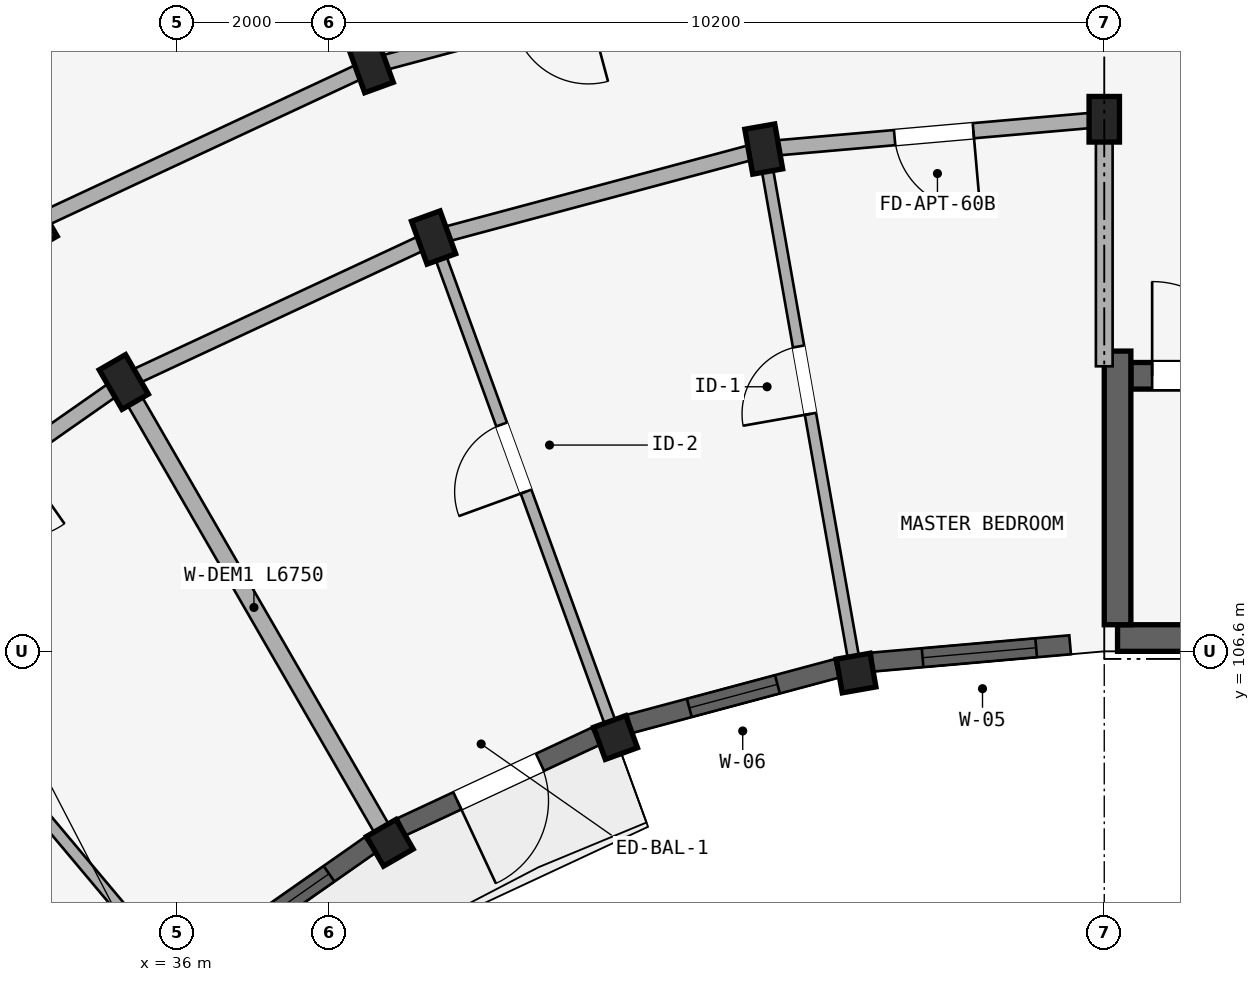
"""IFC4 building model, lengths in metres.
Left out: names, types, materials, properties, quantities, classifications, styles, units other than length and angle.
Written with IfcOpenShell. Run it as: python <this file> out.ifc"""

import sys

from ifc_helpers import new_model, si_unit, direction, frame, frame_2d, origin, origin_2d, place, context, subcontext, project, spatial, rectangle, extrude, element, fill, save


model = new_model("IFC4")
c1 = context("Model", 3, precision=1e-05, world=origin(), true_north=direction((0.0, 1.0)))
c2 = subcontext(c1, "Body", "Model", "MODEL_VIEW")
j1 = project(units=[si_unit("LENGTHUNIT", "METRE"), si_unit("PLANEANGLEUNIT", "RADIAN")], contexts=[c1])
p1 = place(None, origin())
s1 = spatial("IfcSite", under=j1, at=p1, CompositionType="ELEMENT")
p2 = place(p1, origin())
s2 = spatial("IfcBuilding", under=s1, at=p2, CompositionType="ELEMENT")
p3 = place(p2, frame((0.0, 0.0, 43.35)))
s3 = spatial("IfcBuildingStorey", under=s2, at=p3, CompositionType="ELEMENT", Elevation=43.35)
p4 = place(p3, frame((48.375, 106.775, 0.0), z_axis=(0.0, 0.0, 1.0), x_axis=(1.0, 0.0, 0.0)))
e1 = element("IfcWall", 1, at=p4, inside=s3, PredefinedType="SHEAR", context=c2, shape_type="SweptSolid", body=[
    extrude(rectangle(XDim=8.25, YDim=0.35, at=frame_2d((4.125, 0.0))), origin(), (0.0, 0.0, 1.0), 2.93),
])
p5 = place(p3, frame((48.55, 110.225, 0.0), z_axis=(0.0, 0.0, 1.0), x_axis=(1.0, 0.0, 0.0)))
e2 = element("IfcWall", 2, at=p5, inside=s3, PredefinedType="SHEAR", context=c2, shape_type="SweptSolid", body=[
    extrude(rectangle(XDim=7.9, YDim=0.35, at=frame_2d((3.95, 0.0))), origin(), (0.0, 0.0, 1.0), 2.93),
])
p6 = place(p5, frame((0.28, 0.0, 0.0)))
e3 = element("IfcOpeningElement", 3, at=p6, cuts=e2, PredefinedType="OPENING", context=c2, shape_type="SweptSolid", body=[
    extrude(rectangle(XDim=1.24, YDim=2.15, at=frame_2d((0.62, 1.075))), frame((0.0, 0.185, 0.0), z_axis=(0.0, -1.0, 0.0), x_axis=(1.0, 0.0, 0.0)), (0.0, 0.0, 1.0), 0.37),
])
p7 = place(p3, frame((48.375, 106.95, 0.0), z_axis=(0.0, 0.0, 1.0), x_axis=(0.0, 1.0, 0.0)))
e4 = element("IfcWall", 4, at=p7, inside=s3, PredefinedType="SHEAR", context=c2, shape_type="SweptSolid", body=[
    extrude(rectangle(XDim=3.6, YDim=0.35, at=frame_2d((1.8, 0.0))), origin(), (0.0, 0.0, 1.0), 2.93),
])
p8 = place(p3, frame((48.2, 113.6, 0.0), z_axis=(0.0, 0.0, 1.0), x_axis=(1.0, 0.0, 0.0)))
e5 = element("IfcColumn", 5, at=p8, inside=s3, PredefinedType="COLUMN", context=c2, shape_type="SweptSolid", body=[
    extrude(rectangle(XDim=0.4, YDim=0.6, at=origin_2d()), origin(), (0.0, 0.0, 1.0), 2.93),
])
p9 = place(p3, frame((44.935, 106.314, 0.0), z_axis=(0.0, 0.0, 1.0), x_axis=(0.984807753012, 0.173648177667, 0.0)))
e6 = element("IfcColumn", 6, at=p9, inside=s3, PredefinedType="COLUMN", context=c2, shape_type="SweptSolid", body=[
    extrude(rectangle(XDim=0.45, YDim=0.45, at=origin_2d()), origin(), (0.0, 0.0, 1.0), 2.93),
])
p10 = place(p3, frame((43.72, 113.208, 0.0), z_axis=(0.0, 0.0, 1.0), x_axis=(0.984807753012, 0.173648177667, 0.0)))
e7 = element("IfcColumn", 7, at=p10, inside=s3, PredefinedType="COLUMN", context=c2, shape_type="SweptSolid", body=[
    extrude(rectangle(XDim=0.4, YDim=0.6, at=origin_2d()), origin(), (0.0, 0.0, 1.0), 2.93),
])
p11 = place(p3, frame((41.77, 105.466, 0.0), z_axis=(0.0, 0.0, 1.0), x_axis=(0.939692620786, 0.342020143326, 0.0)))
e8 = element("IfcColumn", 8, at=p11, inside=s3, PredefinedType="COLUMN", context=c2, shape_type="SweptSolid", body=[
    extrude(rectangle(XDim=0.45, YDim=0.45, at=origin_2d()), origin(), (0.0, 0.0, 1.0), 2.93),
])
for number, where, z_axis, x_axis in (
    (9, (39.376, 112.044, 0.0), (0.0, 0.0, 1.0), (0.94, 0.342, 0.0)),
    (10, (38.555, 114.299, 0.0), (0.0, 0.0, 1.0), (0.94, 0.342, 0.0)),
):
    element("IfcColumn", number, at=place(p3, frame(where, z_axis=z_axis, x_axis=x_axis)), inside=s3, PredefinedType="COLUMN", context=c2, shape_type="SweptSolid", body=[
        extrude(rectangle(XDim=0.4, YDim=0.6, at=origin_2d()), origin(), (0.0, 0.0, 1.0), 2.93),
    ])
p12 = place(p3, frame((38.8, 104.081, 0.0), z_axis=(0.0, 0.0, 1.0), x_axis=(0.866025403784, 0.5, 0.0)))
e11 = element("IfcColumn", 11, at=p12, inside=s3, PredefinedType="COLUMN", context=c2, shape_type="SweptSolid", body=[
    extrude(rectangle(XDim=0.45, YDim=0.45, at=origin_2d()), origin(), (0.0, 0.0, 1.0), 2.93),
])
for number, where, z_axis, x_axis in (
    (12, (35.3, 110.144, 0.0), (0.0, 0.0, 1.0), (0.866, 0.5, 0.0)),
    (13, (34.1, 112.222, 0.0), (0.0, 0.0, 1.0), (0.866, 0.5, 0.0)),
):
    element("IfcColumn", number, at=place(p3, frame(where, z_axis=z_axis, x_axis=x_axis)), inside=s3, PredefinedType="COLUMN", context=c2, shape_type="SweptSolid", body=[
        extrude(rectangle(XDim=0.4, YDim=0.6, at=origin_2d()), origin(), (0.0, 0.0, 1.0), 2.93),
    ])
p13 = place(p3, frame((48.2, 113.6, 0.0), z_axis=(0.0, 0.0, 1.0), x_axis=(-0.996191949488, -0.087187153726, 0.0)))
e14 = element("IfcWall", 14, at=p13, inside=s3, PredefinedType="STANDARD", context=c2, shape_type="SweptSolid", body=[
    extrude(rectangle(XDim=4.497, YDim=0.2, at=frame_2d((2.249, 0.0))), origin(), (0.0, 0.0, 1.0), 2.372),
])
p14 = place(p13, frame((1.729, 0.0, 0.0)))
e15 = element("IfcOpeningElement", 15, at=p14, cuts=e14, PredefinedType="OPENING", context=c2, shape_type="SweptSolid", body=[
    extrude(rectangle(XDim=1.04, YDim=2.15, at=frame_2d((0.52, 1.075))), frame((0.0, 0.11, 0.0), z_axis=(0.0, -1.0, 0.0), x_axis=(1.0, 0.0, 0.0)), (0.0, 0.0, 1.0), 0.22),
])
p15 = place(p3, frame((43.72, 113.208, 0.0), z_axis=(0.0, 0.0, 1.0), x_axis=(-0.965934240054, -0.258787642463, 0.0)))
e16 = element("IfcWall", 16, at=p15, inside=s3, PredefinedType="STANDARD", context=c2, shape_type="SweptSolid", body=[
    extrude(rectangle(XDim=4.497, YDim=0.2, at=frame_2d((2.249, 0.0))), origin(), (0.0, 0.0, 1.0), 2.372),
])
p16 = place(p3, frame((43.303, 115.572, 0.0), z_axis=(0.0, 0.0, 1.0), x_axis=(-0.965930095386, -0.258803112091, 0.0)))
e17 = element("IfcWall", 17, at=p16, inside=s3, PredefinedType="STANDARD", context=c2, shape_type="SweptSolid", body=[
    extrude(rectangle(XDim=4.916, YDim=0.2, at=frame_2d((2.458, 0.0))), origin(), (0.0, 0.0, 1.0), 2.372),
])
p17 = place(p16, frame((1.958, 0.0, 0.0)))
e18 = element("IfcOpeningElement", 18, at=p17, cuts=e17, PredefinedType="OPENING", context=c2, shape_type="SweptSolid", body=[
    extrude(rectangle(XDim=1.0, YDim=2.15, at=frame_2d((0.5, 1.075))), frame((0.0, 0.11, 0.0), z_axis=(0.0, -1.0, 0.0), x_axis=(1.0, 0.0, 0.0)), (0.0, 0.0, 1.0), 0.22),
])
p18 = place(p3, frame((39.376, 112.044, 0.0), z_axis=(0.0, 0.0, 1.0), x_axis=(-0.906307919131, -0.422617978463, 0.0)))
e19 = element("IfcWall", 19, at=p18, inside=s3, PredefinedType="STANDARD", context=c2, shape_type="SweptSolid", body=[
    extrude(rectangle(XDim=4.497, YDim=0.2, at=frame_2d((2.249, 0.0))), origin(), (0.0, 0.0, 1.0), 2.372),
])
p19 = place(p3, frame((38.555, 114.299, 0.0), z_axis=(0.0, 0.0, 1.0), x_axis=(-0.906302381024, -0.422629854778, 0.0)))
e20 = element("IfcWall", 20, at=p19, inside=s3, PredefinedType="STANDARD", context=c2, shape_type="SweptSolid", body=[
    extrude(rectangle(XDim=4.915, YDim=0.2, at=frame_2d((2.458, 0.0))), origin(), (0.0, 0.0, 1.0), 2.372),
])
p20 = place(p3, frame((35.3, 110.144, 0.0), z_axis=(0.0, 0.0, 1.0), x_axis=(-0.819155404658, -0.573571637217, 0.0)))
e21 = element("IfcWall", 21, at=p20, inside=s3, PredefinedType="STANDARD", context=c2, shape_type="SweptSolid", body=[
    extrude(rectangle(XDim=4.497, YDim=0.2, at=frame_2d((2.249, 0.0))), origin(), (0.0, 0.0, 1.0), 2.372),
])
p21 = place(p20, frame((1.709, 0.0, 0.0)))
e22 = element("IfcOpeningElement", 22, at=p21, cuts=e21, PredefinedType="OPENING", context=c2, shape_type="SweptSolid", body=[
    extrude(rectangle(XDim=1.08, YDim=2.15, at=frame_2d((0.54, 1.075))), frame((0.0, 0.11, 0.0), z_axis=(0.0, -1.0, 0.0), x_axis=(1.0, 0.0, 0.0)), (0.0, 0.0, 1.0), 0.22),
])
p22 = place(p3, frame((48.2, 110.35, 0.0), z_axis=(0.0, 0.0, 1.0), x_axis=(0.0, 1.0, 0.0)))
e23 = element("IfcWall", 23, at=p22, inside=s3, PredefinedType="STANDARD", context=c2, shape_type="SweptSolid", body=[
    extrude(rectangle(XDim=3.2, YDim=0.22, at=frame_2d((1.6, 0.0))), origin(), (0.0, 0.0, 1.0), 2.372),
])
p23 = place(p3, frame((44.901, 106.511, 0.0), z_axis=(0.0, 0.0, 1.0), x_axis=(-0.173647089161, 0.984807944945, 0.0)))
e24 = element("IfcWall", 24, at=p23, inside=s3, PredefinedType="PARTITIONING", context=c2, shape_type="SweptSolid", body=[
    extrude(rectangle(XDim=6.75, YDim=0.15, at=frame_2d((3.375, 0.0))), origin(), (0.0, 0.0, 1.0), 2.372),
])
p24 = place(p23, frame((3.262, 0.0, 0.0)))
e25 = element("IfcOpeningElement", 25, at=p24, cuts=e24, PredefinedType="OPENING", context=c2, shape_type="SweptSolid", body=[
    extrude(rectangle(XDim=0.9, YDim=2.1, at=frame_2d((0.45, 1.05))), frame((0.0, 0.085, 0.0), z_axis=(0.0, -1.0, 0.0), x_axis=(1.0, 0.0, 0.0)), (0.0, 0.0, 1.0), 0.17),
])
p25 = place(p3, frame((41.702, 105.654, 0.0), z_axis=(0.0, 0.0, 1.0), x_axis=(-0.342010221662, 0.939696231917, 0.0)))
e26 = element("IfcWall", 26, at=p25, inside=s3, PredefinedType="PARTITIONING", context=c2, shape_type="SweptSolid", body=[
    extrude(rectangle(XDim=6.75, YDim=0.15, at=frame_2d((3.375, 0.0))), origin(), (0.0, 0.0, 1.0), 2.372),
])
p26 = place(p25, frame((3.242, 0.0, 0.0)))
e27 = element("IfcOpeningElement", 27, at=p26, cuts=e26, PredefinedType="OPENING", context=c2, shape_type="SweptSolid", body=[
    extrude(rectangle(XDim=0.94, YDim=2.1, at=frame_2d((0.47, 1.05))), frame((0.0, 0.085, 0.0), z_axis=(0.0, -1.0, 0.0), x_axis=(1.0, 0.0, 0.0)), (0.0, 0.0, 1.0), 0.17),
])
p27 = place(p3, frame((38.521, 114.393, 0.0), z_axis=(0.0, 0.0, 1.0), x_axis=(-0.342005081534, 0.939698102693, 0.0)))
e28 = element("IfcWall", 28, at=p27, inside=s3, PredefinedType="PARTITIONING", context=c2, shape_type="SweptSolid", body=[
    extrude(rectangle(XDim=11.82, YDim=0.125, at=frame_2d((5.91, 0.0))), origin(), (0.0, 0.0, 1.0), 2.372),
])
p28 = place(p27, frame((7.5, 0.0, 0.0)))
e29 = element("IfcOpeningElement", 29, at=p28, cuts=e28, PredefinedType="OPENING", context=c2, shape_type="SweptSolid", body=[
    extrude(rectangle(XDim=0.8, YDim=2.1, at=frame_2d((0.4, 1.05))), frame((0.0, 0.073, 0.0), z_axis=(0.0, -1.0, 0.0), x_axis=(1.0, 0.0, 0.0)), (0.0, 0.0, 1.0), 0.145),
])
p29 = place(p3, frame((38.7, 104.254, 0.0), z_axis=(0.0, 0.0, 1.0), x_axis=(-0.499997969693, 0.866026575979, 0.0)))
e30 = element("IfcWall", 30, at=p29, inside=s3, PredefinedType="STANDARD", context=c2, shape_type="SweptSolid", body=[
    extrude(rectangle(XDim=6.75, YDim=0.22, at=frame_2d((3.375, 0.0))), origin(), (0.0, 0.0, 1.0), 2.372),
])
p30 = place(p3, frame((35.987, 102.355, 0.0), z_axis=(0.0, 0.0, 1.0), x_axis=(-0.642784846501, 0.766046761698, 0.0)))
e31 = element("IfcWall", 31, at=p30, inside=s3, PredefinedType="PARTITIONING", context=c2, shape_type="SweptSolid", body=[
    extrude(rectangle(XDim=6.75, YDim=0.15, at=frame_2d((3.375, 0.0))), origin(), (0.0, 0.0, 1.0), 2.372),
])
p31 = place(p30, frame((3.262, 0.0, 0.0)))
e32 = element("IfcOpeningElement", 32, at=p31, cuts=e31, PredefinedType="OPENING", context=c2, shape_type="SweptSolid", body=[
    extrude(rectangle(XDim=0.9, YDim=2.1, at=frame_2d((0.45, 1.05))), frame((0.0, 0.085, 0.0), z_axis=(0.0, -1.0, 0.0), x_axis=(1.0, 0.0, 0.0)), (0.0, 0.0, 1.0), 0.17),
])
p32 = place(p3, frame((47.751, 106.686, 0.0), z_axis=(0.0, 0.0, 1.0), x_axis=(-0.996188433092, -0.087227322402, 0.0)))
e33 = element("IfcWall", 33, at=p32, inside=s3, PredefinedType="STANDARD", context=c2, shape_type="SweptSolid", body=[
    extrude(rectangle(XDim=2.609, YDim=0.25, at=frame_2d((1.304, 0.0))), origin(), (0.0, 0.0, 1.0), 2.422),
])
p33 = place(p32, frame((0.448, 0.0, 0.572)))
e34 = element("IfcOpeningElement", 34, at=p33, cuts=e33, PredefinedType="OPENING", context=c2, shape_type="SweptSolid", body=[
    extrude(rectangle(XDim=1.5, YDim=1.65, at=frame_2d((0.75, 0.825))), frame((0.0, 0.135, 0.0), z_axis=(0.0, -1.0, 0.0), x_axis=(1.0, 0.0, 0.0)), (0.0, 0.0, 1.0), 0.27),
])
p34 = place(p3, frame((44.682, 106.376, 0.0), z_axis=(0.0, 0.0, 1.0), x_axis=(-0.965921001908, -0.258837049266, 0.0)))
e35 = element("IfcWall", 35, at=p34, inside=s3, PredefinedType="STANDARD", context=c2, shape_type="SweptSolid", body=[
    extrude(rectangle(XDim=2.82, YDim=0.25, at=frame_2d((1.41, 0.0))), origin(), (0.0, 0.0, 1.0), 2.422),
])
p35 = place(p34, frame((0.81, 0.0, 0.722)))
e36 = element("IfcOpeningElement", 36, at=p35, cuts=e35, PredefinedType="OPENING", context=c2, shape_type="SweptSolid", body=[
    extrude(rectangle(XDim=1.2, YDim=1.5, at=frame_2d((0.6, 0.75))), frame((0.0, 0.135, 0.0), z_axis=(0.0, -1.0, 0.0), x_axis=(1.0, 0.0, 0.0)), (0.0, 0.0, 1.0), 0.27),
])
p36 = place(p3, frame((41.51, 105.483, 0.0), z_axis=(0.0, 0.0, 1.0), x_axis=(-0.906284857185, -0.422667431484, 0.0)))
e37 = element("IfcWall", 37, at=p36, inside=s3, PredefinedType="STANDARD", context=c2, shape_type="SweptSolid", body=[
    extrude(rectangle(XDim=2.82, YDim=0.25, at=frame_2d((1.41, 0.0))), origin(), (0.0, 0.0, 1.0), 2.422),
])
p37 = place(p36, frame((0.81, 0.0, 0.0)))
e38 = element("IfcOpeningElement", 38, at=p37, cuts=e37, PredefinedType="OPENING", context=c2, shape_type="SweptSolid", body=[
    extrude(rectangle(XDim=1.2, YDim=2.15, at=frame_2d((0.6, 1.075))), frame((0.0, 0.135, 0.0), z_axis=(0.0, -1.0, 0.0), x_axis=(1.0, 0.0, 0.0)), (0.0, 0.0, 1.0), 0.27),
])
p38 = place(p3, frame((38.541, 104.053, 0.0), z_axis=(0.0, 0.0, 1.0), x_axis=(-0.819154644592, -0.573572722716, 0.0)))
e39 = element("IfcWall", 39, at=p38, inside=s3, PredefinedType="STANDARD", context=c2, shape_type="SweptSolid", body=[
    extrude(rectangle(XDim=2.82, YDim=0.25, at=frame_2d((1.41, 0.0))), origin(), (0.0, 0.0, 1.0), 2.422),
])
p39 = place(p38, frame((0.66, 0.0, 0.572)))
e40 = element("IfcOpeningElement", 40, at=p39, cuts=e39, PredefinedType="OPENING", context=c2, shape_type="SweptSolid", body=[
    extrude(rectangle(XDim=1.5, YDim=1.65, at=frame_2d((0.75, 0.825))), frame((0.0, 0.135, 0.0), z_axis=(0.0, -1.0, 0.0), x_axis=(1.0, 0.0, 0.0)), (0.0, 0.0, 1.0), 0.27),
])
p40 = place(p33, origin())
e41 = element("IfcWindow", 41, at=p40, inside=s3, PartitioningType="DOUBLE_PANEL_VERTICAL", PredefinedType="WINDOW", context=c2, shape_type="SweptSolid", body=[
    extrude(rectangle(XDim=1.5, YDim=1.65, at=frame_2d((0.75, 0.825))), frame((0.0, 0.03, 0.0), z_axis=(0.0, -1.0, 0.0), x_axis=(1.0, 0.0, 0.0)), (0.0, 0.0, 1.0), 0.06),
])
fill(e34, e41)
p41 = place(p35, origin())
e42 = element("IfcWindow", 42, at=p41, inside=s3, PartitioningType="SINGLE_PANEL", PredefinedType="WINDOW", context=c2, shape_type="SweptSolid", body=[
    extrude(rectangle(XDim=1.2, YDim=1.5, at=frame_2d((0.6, 0.75))), frame((0.0, 0.03, 0.0), z_axis=(0.0, -1.0, 0.0), x_axis=(1.0, 0.0, 0.0)), (0.0, 0.0, 1.0), 0.06),
])
fill(e36, e42)
p42 = place(p39, origin())
e43 = element("IfcWindow", 43, at=p42, inside=s3, PartitioningType="DOUBLE_PANEL_VERTICAL", PredefinedType="WINDOW", context=c2, shape_type="SweptSolid", body=[
    extrude(rectangle(XDim=1.5, YDim=1.65, at=frame_2d((0.75, 0.825))), frame((0.0, 0.03, 0.0), z_axis=(0.0, -1.0, 0.0), x_axis=(1.0, 0.0, 0.0)), (0.0, 0.0, 1.0), 0.06),
])
fill(e40, e43)
p43 = place(p6, frame((1.24, 0.0, 0.0), z_axis=(0.0, 0.0, 1.0), x_axis=(-1.0, 0.0, 0.0)))
e44 = element("IfcDoor", 44, at=p43, inside=s3, OperationType="SINGLE_SWING_RIGHT", PredefinedType="DOOR", context=c2, shape_type="SweptSolid", body=[
    extrude(rectangle(XDim=1.24, YDim=2.15, at=frame_2d((0.62, 1.075))), frame((0.0, 0.025, 0.0), z_axis=(0.0, -1.0, 0.0), x_axis=(1.0, 0.0, 0.0)), (0.0, 0.0, 1.0), 0.05),
])
fill(e3, e44)
p44 = place(p24, frame((0.9, 0.0, 0.0), z_axis=(0.0, 0.0, 1.0), x_axis=(-1.0, 0.0, 0.0)))
e45 = element("IfcDoor", 45, at=p44, inside=s3, OperationType="SINGLE_SWING_RIGHT", PredefinedType="DOOR", context=c2, shape_type="SweptSolid", body=[
    extrude(rectangle(XDim=0.9, YDim=2.1, at=frame_2d((0.45, 1.05))), frame((0.0, 0.025, 0.0), z_axis=(0.0, -1.0, 0.0), x_axis=(1.0, 0.0, 0.0)), (0.0, 0.0, 1.0), 0.05),
])
fill(e25, e45)
p45 = place(p26, origin())
e46 = element("IfcDoor", 46, at=p45, inside=s3, OperationType="SINGLE_SWING_LEFT", PredefinedType="DOOR", context=c2, shape_type="SweptSolid", body=[
    extrude(rectangle(XDim=0.94, YDim=2.1, at=frame_2d((0.47, 1.05))), frame((0.0, 0.025, 0.0), z_axis=(0.0, -1.0, 0.0), x_axis=(1.0, 0.0, 0.0)), (0.0, 0.0, 1.0), 0.05),
])
fill(e27, e46)
p46 = place(p14, frame((1.04, 0.0, 0.0), z_axis=(0.0, 0.0, 1.0), x_axis=(-1.0, 0.0, 0.0)))
e47 = element("IfcDoor", 47, at=p46, inside=s3, OperationType="SINGLE_SWING_RIGHT", PredefinedType="DOOR", context=c2, shape_type="SweptSolid", body=[
    extrude(rectangle(XDim=1.04, YDim=2.15, at=frame_2d((0.52, 1.075))), frame((0.0, 0.025, 0.0), z_axis=(0.0, -1.0, 0.0), x_axis=(1.0, 0.0, 0.0)), (0.0, 0.0, 1.0), 0.05),
])
fill(e15, e47)
p47 = place(p37, origin())
e48 = element("IfcDoor", 48, at=p47, inside=s3, OperationType="SINGLE_SWING_RIGHT", PredefinedType="DOOR", context=c2, shape_type="SweptSolid", body=[
    extrude(rectangle(XDim=1.2, YDim=2.15, at=frame_2d((0.6, 1.075))), frame((0.0, 0.025, 0.0), z_axis=(0.0, -1.0, 0.0), x_axis=(1.0, 0.0, 0.0)), (0.0, 0.0, 1.0), 0.05),
])
fill(e38, e48)
save(model, sys.argv[1])
